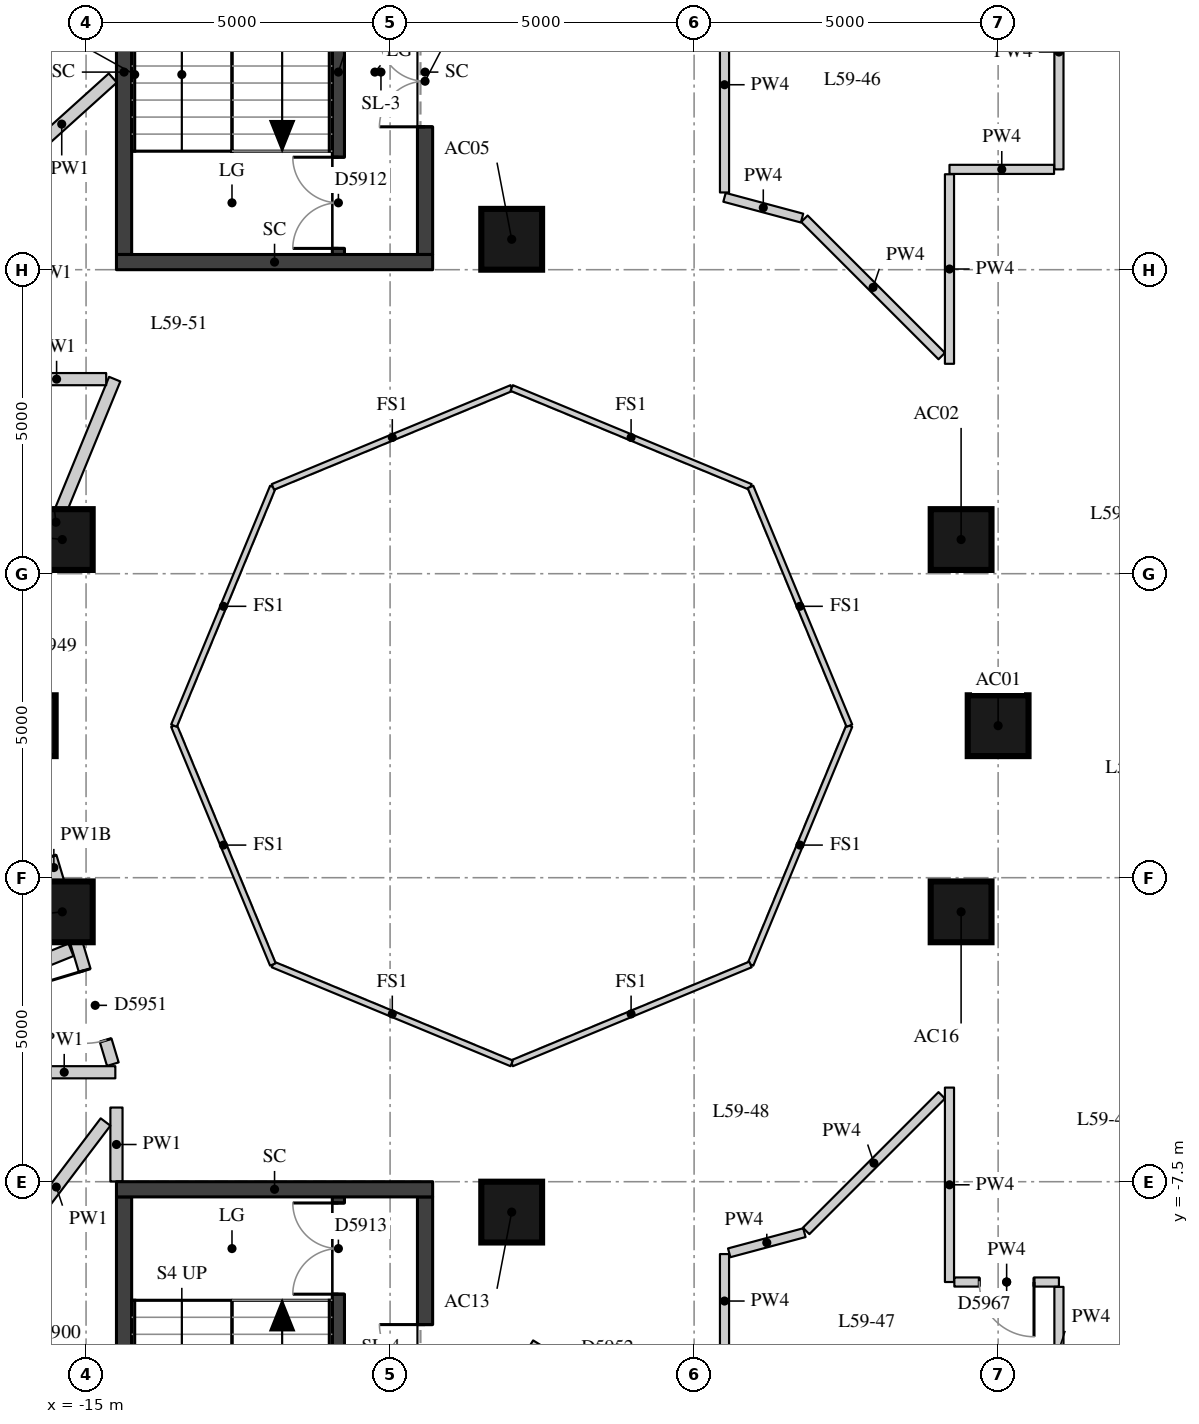
"""IFC4 building model, lengths in metres.
Left out: names, types, materials, properties, quantities, classifications, styles, units other than length and angle.
Written with IfcOpenShell. Run it as: python <this file> out.ifc"""

import sys

from ifc_helpers import new_model, si_unit, direction, frame, frame_2d, origin, origin_2d, place, context, subcontext, project, spatial, rectangle, extrude, element, fill, save


model = new_model("IFC4")
c1 = context("Model", 3, precision=1e-05, world=origin(), true_north=direction((0.0, 1.0)))
c2 = subcontext(c1, "Body", "Model", "MODEL_VIEW")
j1 = project(units=[si_unit("LENGTHUNIT", "METRE"), si_unit("PLANEANGLEUNIT", "RADIAN")], contexts=[c1])
p1 = place(None, origin())
s1 = spatial("IfcSite", under=j1, at=p1, CompositionType="ELEMENT")
p2 = place(p1, origin())
s2 = spatial("IfcBuilding", under=s1, at=p2, CompositionType="ELEMENT")
p3 = place(p2, frame((0.0, 0.0, 209.0)))
s3 = spatial("IfcBuildingStorey", under=s2, at=p3, CompositionType="ELEMENT", Elevation=209.0)
for number, where, z_axis, x_axis in (
    (1, (0.0, 0.0, 0.0), (0.0, 0.0, 1.0), (1.0, 0.0, 0.0)),
    (2, (-0.609, 3.062, 0.0), (0.0, 0.0, 1.0), (1.0, 0.0, 0.0)),
    (3, (-8.0, 8.0, 0.0), (0.0, 0.0, 1.0), (1.0, 0.0, 0.0)),
    (4, (-15.391, 3.062, 0.0), (0.0, 0.0, 1.0), (1.0, 0.0, 0.0)),
    (5, (-16.0, 0.0, 0.0), (0.0, 0.0, 1.0), (1.0, 0.0, 0.0)),
    (6, (-15.391, -3.062, 0.0), (0.0, 0.0, 1.0), (1.0, 0.0, 0.0)),
    (7, (-8.0, -8.0, 0.0), (0.0, 0.0, 1.0), (1.0, 0.0, 0.0)),
    (8, (-0.609, -3.062, 0.0), (0.0, 0.0, 1.0), (1.0, 0.0, 0.0)),
):
    element("IfcColumn", number, at=place(p3, frame(where, z_axis=z_axis, x_axis=x_axis)), inside=s3, PredefinedType="COLUMN", context=c2, shape_type="SweptSolid", body=[
        extrude(rectangle(XDim=1.0, YDim=1.0, at=origin_2d()), origin(), (0.0, 0.0, 1.0), 3.3),
    ])
p4 = place(p3, frame((-10.85, 7.75, 0.0), z_axis=(0.0, 0.0, 1.0), x_axis=(0.0, 1.0, 0.0)))
e9 = element("IfcWall", 9, at=p4, inside=s3, PredefinedType="SHEAR", context=c2, shape_type="SweptSolid", body=[
    extrude(rectangle(XDim=6.0, YDim=0.2, at=frame_2d((3.0, 0.0))), origin(), (0.0, 0.0, 1.0), 3.02),
])
p5 = place(p4, frame((0.1, 0.0, 0.0)))
e10 = element("IfcOpeningElement", 10, at=p5, cuts=e9, PredefinedType="OPENING", context=c2, shape_type="SweptSolid", body=[
    extrude(rectangle(XDim=1.5, YDim=2.1, at=frame_2d((0.75, 1.05))), frame((0.0, 0.11, 0.0), z_axis=(0.0, -1.0, 0.0), x_axis=(1.0, 0.0, 0.0)), (0.0, 0.0, 1.0), 0.22),
])
p6 = place(p3, frame((-10.85, -13.75, 0.0), z_axis=(0.0, 0.0, 1.0), x_axis=(0.0, 1.0, 0.0)))
e11 = element("IfcWall", 11, at=p6, inside=s3, PredefinedType="SHEAR", context=c2, shape_type="SweptSolid", body=[
    extrude(rectangle(XDim=6.0, YDim=0.2, at=frame_2d((3.0, 0.0))), origin(), (0.0, 0.0, 1.0), 3.02),
])
p7 = place(p6, frame((4.4, 0.0, 0.0)))
e12 = element("IfcOpeningElement", 12, at=p7, cuts=e11, PredefinedType="OPENING", context=c2, shape_type="SweptSolid", body=[
    extrude(rectangle(XDim=1.5, YDim=2.1, at=frame_2d((0.75, 1.05))), frame((0.0, 0.11, 0.0), z_axis=(0.0, -1.0, 0.0), x_axis=(1.0, 0.0, 0.0)), (0.0, 0.0, 1.0), 0.22),
])
p8 = place(p3, frame((-14.375, 7.75, -0.28), z_axis=(0.0, 0.0, 1.0), x_axis=(0.0, 1.0, 0.0)))
e13 = element("IfcWall", 13, at=p8, inside=s3, PredefinedType="SHEAR", context=c2, shape_type="SweptSolid", body=[
    extrude(rectangle(XDim=6.0, YDim=0.25, at=frame_2d((3.0, 0.0))), origin(), (0.0, 0.0, 1.0), 3.3),
])
p9 = place(p3, frame((-9.425, 7.75, -0.28), z_axis=(0.0, 0.0, 1.0), x_axis=(0.0, 1.0, 0.0)))
e14 = element("IfcWall", 14, at=p9, inside=s3, PredefinedType="SHEAR", context=c2, shape_type="SweptSolid", body=[
    extrude(rectangle(XDim=6.0, YDim=0.25, at=frame_2d((3.0, 0.0))), origin(), (0.0, 0.0, 1.0), 3.3),
])
p10 = place(p9, frame((2.1, 0.0, 0.28)))
e15 = element("IfcOpeningElement", 15, at=p10, cuts=e14, PredefinedType="OPENING", context=c2, shape_type="SweptSolid", body=[
    extrude(rectangle(XDim=1.5, YDim=2.1, at=frame_2d((0.75, 1.05))), frame((0.0, 0.135, 0.0), z_axis=(0.0, -1.0, 0.0), x_axis=(1.0, 0.0, 0.0)), (0.0, 0.0, 1.0), 0.27),
])
p11 = place(p3, frame((-14.5, 7.625, -0.28), z_axis=(0.0, 0.0, 1.0), x_axis=(1.0, 0.0, 0.0)))
e16 = element("IfcWall", 16, at=p11, inside=s3, PredefinedType="SHEAR", context=c2, shape_type="SweptSolid", body=[
    extrude(rectangle(XDim=5.2, YDim=0.25, at=frame_2d((2.6, 0.0))), origin(), (0.0, 0.0, 1.0), 3.3),
])
p12 = place(p3, frame((-14.375, -13.75, -0.28), z_axis=(0.0, 0.0, 1.0), x_axis=(0.0, 1.0, 0.0)))
e17 = element("IfcWall", 17, at=p12, inside=s3, PredefinedType="SHEAR", context=c2, shape_type="SweptSolid", body=[
    extrude(rectangle(XDim=6.0, YDim=0.25, at=frame_2d((3.0, 0.0))), origin(), (0.0, 0.0, 1.0), 3.3),
])
p13 = place(p3, frame((-9.425, -13.75, -0.28), z_axis=(0.0, 0.0, 1.0), x_axis=(0.0, 1.0, 0.0)))
e18 = element("IfcWall", 18, at=p13, inside=s3, PredefinedType="SHEAR", context=c2, shape_type="SweptSolid", body=[
    extrude(rectangle(XDim=6.0, YDim=0.25, at=frame_2d((3.0, 0.0))), origin(), (0.0, 0.0, 1.0), 3.3),
])
p14 = place(p13, frame((2.4, 0.0, 0.28)))
e19 = element("IfcOpeningElement", 19, at=p14, cuts=e18, PredefinedType="OPENING", context=c2, shape_type="SweptSolid", body=[
    extrude(rectangle(XDim=1.5, YDim=2.1, at=frame_2d((0.75, 1.05))), frame((0.0, 0.135, 0.0), z_axis=(0.0, -1.0, 0.0), x_axis=(1.0, 0.0, 0.0)), (0.0, 0.0, 1.0), 0.27),
])
p15 = place(p3, frame((-14.5, -7.625, -0.28), z_axis=(0.0, 0.0, 1.0), x_axis=(1.0, 0.0, 0.0)))
e20 = element("IfcWall", 20, at=p15, inside=s3, PredefinedType="SHEAR", context=c2, shape_type="SweptSolid", body=[
    extrude(rectangle(XDim=5.2, YDim=0.25, at=frame_2d((2.6, 0.0))), origin(), (0.0, 0.0, 1.0), 3.3),
])
p16 = place(p3, frame((-2.528, -13.4, 0.0), z_axis=(0.0, 0.0, 1.0), x_axis=(-0.850088088191, 0.526640524757, 0.0)))
e21 = element("IfcWall", 21, at=p16, inside=s3, PredefinedType="PARTITIONING", context=c2, shape_type="SweptSolid", body=[
    extrude(rectangle(XDim=6.084, YDim=0.2, at=frame_2d((3.042, 0.0))), origin(), (0.0, 0.0, 1.0), 3.02),
])
p17 = place(p16, frame((4.031, 0.0, 0.0)))
e22 = element("IfcOpeningElement", 22, at=p17, cuts=e21, PredefinedType="OPENING", context=c2, shape_type="SweptSolid", body=[
    extrude(rectangle(XDim=1.1, YDim=2.1, at=frame_2d((0.55, 1.05))), frame((0.0, 0.11, 0.0), z_axis=(0.0, -1.0, 0.0), x_axis=(1.0, 0.0, 0.0)), (0.0, 0.0, 1.0), 0.22),
])
p18 = place(p16, frame((1.206, 0.0, 0.0)))
e23 = element("IfcOpeningElement", 23, at=p18, cuts=e21, PredefinedType="OPENING", context=c2, shape_type="SweptSolid", body=[
    extrude(rectangle(XDim=0.9, YDim=2.1, at=frame_2d((0.45, 1.05))), frame((0.0, 0.11, 0.0), z_axis=(0.0, -1.0, 0.0), x_axis=(1.0, 0.0, 0.0)), (0.0, 0.0, 1.0), 0.22),
])
p19 = place(p3, frame((-14.5, -7.496, 0.0), z_axis=(0.0, 0.0, 1.0), x_axis=(0.0, 1.0, 0.0)))
e24 = element("IfcWall", 24, at=p19, inside=s3, PredefinedType="PARTITIONING", context=c2, shape_type="SweptSolid", body=[
    extrude(rectangle(XDim=1.216, YDim=0.2, at=frame_2d((0.608, 0.0))), origin(), (0.0, 0.0, 1.0), 3.02),
])
p20 = place(p3, frame((-14.679, -6.518, 0.0), z_axis=(0.0, 0.0, 1.0), x_axis=(-0.603820908912, -0.797120009761, 0.0)))
e25 = element("IfcWall", 25, at=p20, inside=s3, PredefinedType="PARTITIONING", context=c2, shape_type="SweptSolid", body=[
    extrude(rectangle(XDim=2.684, YDim=0.2, at=frame_2d((1.342, 0.0))), origin(), (0.0, 0.0, 1.0), 3.02),
])
p21 = place(p3, frame((-16.2, -5.7, 0.0), z_axis=(0.0, 0.0, 1.0), x_axis=(1.0, 0.0, 0.0)))
e26 = element("IfcWall", 26, at=p21, inside=s3, PredefinedType="PARTITIONING", context=c2, shape_type="SweptSolid", body=[
    extrude(rectangle(XDim=1.681, YDim=0.2, at=frame_2d((0.841, 0.0))), origin(), (0.0, 0.0, 1.0), 3.02),
])
p22 = place(p3, frame((-14.56, -5.567, 0.0), z_axis=(0.0, 0.0, 1.0), x_axis=(-0.287410918602, 0.95780737305, 0.0)))
e27 = element("IfcWall", 27, at=p22, inside=s3, PredefinedType="PARTITIONING", context=c2, shape_type="SweptSolid", body=[
    extrude(rectangle(XDim=6.751, YDim=0.2, at=frame_2d((3.376, 0.0))), origin(), (0.0, 0.0, 1.0), 2.52),
])
p23 = place(p22, frame((3.561, 0.0, 0.0)))
e28 = element("IfcOpeningElement", 28, at=p23, cuts=e27, PredefinedType="OPENING", context=c2, shape_type="SweptSolid", body=[
    extrude(rectangle(XDim=1.1, YDim=2.1, at=frame_2d((0.55, 1.05))), frame((0.0, 0.11, 0.0), z_axis=(0.0, -1.0, 0.0), x_axis=(1.0, 0.0, 0.0)), (0.0, 0.0, 1.0), 0.22),
])
p24 = place(p22, frame((0.41, 0.0, 0.0)))
e29 = element("IfcOpeningElement", 29, at=p24, cuts=e27, PredefinedType="OPENING", context=c2, shape_type="SweptSolid", body=[
    extrude(rectangle(XDim=1.2, YDim=2.1, at=frame_2d((0.6, 1.05))), frame((0.0, 0.11, 0.0), z_axis=(0.0, -1.0, 0.0), x_axis=(1.0, 0.0, 0.0)), (0.0, 0.0, 1.0), 0.22),
])
p25 = place(p3, frame((-16.462, 0.993, 0.0), z_axis=(0.0, 0.0, 1.0), x_axis=(0.37991958703, 0.925019517303, 0.0)))
e30 = element("IfcWall", 30, at=p25, inside=s3, PredefinedType="PARTITIONING", context=c2, shape_type="SweptSolid", body=[
    extrude(rectangle(XDim=5.089, YDim=0.2, at=frame_2d((2.544, 0.0))), origin(), (0.0, 0.0, 1.0), 2.52),
])
p26 = place(p25, frame((0.36, 0.0, 0.0)))
e31 = element("IfcOpeningElement", 31, at=p26, cuts=e30, PredefinedType="OPENING", context=c2, shape_type="SweptSolid", body=[
    extrude(rectangle(XDim=1.1, YDim=2.1, at=frame_2d((0.55, 1.05))), frame((0.0, 0.11, 0.0), z_axis=(0.0, -1.0, 0.0), x_axis=(1.0, 0.0, 0.0)), (0.0, 0.0, 1.0), 0.22),
])
p27 = place(p3, frame((-14.669, 5.7, 0.0), z_axis=(0.0, 0.0, 1.0), x_axis=(-1.0, 0.0, 0.0)))
e32 = element("IfcWall", 32, at=p27, inside=s3, PredefinedType="PARTITIONING", context=c2, shape_type="SweptSolid", body=[
    extrude(rectangle(XDim=1.631, YDim=0.2, at=frame_2d((0.815, 0.0))), origin(), (0.0, 0.0, 1.0), 3.02),
])
p28 = place(p3, frame((-16.24, 9.136, 0.0), z_axis=(0.0, 0.0, 1.0), x_axis=(0.74251608424, 0.66982823518, 0.0)))
e33 = element("IfcWall", 33, at=p28, inside=s3, PredefinedType="PARTITIONING", context=c2, shape_type="SweptSolid", body=[
    extrude(rectangle(XDim=2.264, YDim=0.2, at=frame_2d((1.132, 0.0))), origin(), (0.0, 0.0, 1.0), 3.02),
])
p29 = place(p3, frame((1.0, 13.011, 0.0), z_axis=(0.0, 0.0, 1.0), x_axis=(0.0, -1.0, 0.0)))
e34 = element("IfcWall", 34, at=p29, inside=s3, PredefinedType="PARTITIONING", context=c2, shape_type="SweptSolid", body=[
    extrude(rectangle(XDim=3.861, YDim=0.15, at=frame_2d((1.93, 0.0))), origin(), (0.0, 0.0, 1.0), 3.02),
])
p30 = place(p3, frame((0.92, 9.15, 0.0), z_axis=(0.0, 0.0, 1.0), x_axis=(-1.0, 0.0, 0.0)))
e35 = element("IfcWall", 35, at=p30, inside=s3, PredefinedType="PARTITIONING", context=c2, shape_type="SweptSolid", body=[
    extrude(rectangle(XDim=1.72, YDim=0.15, at=frame_2d((0.86, 0.0))), origin(), (0.0, 0.0, 1.0), 3.02),
])
p31 = place(p3, frame((-0.8, 9.07, 0.0), z_axis=(0.0, 0.0, 1.0), x_axis=(0.0, -1.0, 0.0)))
e36 = element("IfcWall", 36, at=p31, inside=s3, PredefinedType="PARTITIONING", context=c2, shape_type="SweptSolid", body=[
    extrude(rectangle(XDim=3.118, YDim=0.15, at=frame_2d((1.559, 0.0))), origin(), (0.0, 0.0, 1.0), 3.02),
])
p32 = place(p3, frame((-0.927, 6.08, 0.0), z_axis=(0.0, 0.0, 1.0), x_axis=(-0.707106781187, 0.707106781187, 0.0)))
e37 = element("IfcWall", 37, at=p32, inside=s3, PredefinedType="PARTITIONING", context=c2, shape_type="SweptSolid", body=[
    extrude(rectangle(XDim=3.194, YDim=0.15, at=frame_2d((1.597, 0.0))), origin(), (0.0, 0.0, 1.0), 3.02),
])
p33 = place(p3, frame((-3.225, 8.348, 0.0), z_axis=(0.0, 0.0, 1.0), x_axis=(-0.965915035697, 0.258859312783, 0.0)))
e38 = element("IfcWall", 38, at=p33, inside=s3, PredefinedType="PARTITIONING", context=c2, shape_type="SweptSolid", body=[
    extrude(rectangle(XDim=1.32, YDim=0.15, at=frame_2d((0.66, 0.0))), origin(), (0.0, 0.0, 1.0), 3.02),
])
p34 = place(p3, frame((-4.5, 8.77, 0.0), z_axis=(0.0, 0.0, 1.0), x_axis=(0.0, 1.0, 0.0)))
e39 = element("IfcWall", 39, at=p34, inside=s3, PredefinedType="PARTITIONING", context=c2, shape_type="SweptSolid", body=[
    extrude(rectangle(XDim=3.543, YDim=0.15, at=frame_2d((1.772, 0.0))), origin(), (0.0, 0.0, 1.0), 3.02),
])
p35 = place(p3, frame((-0.8, -5.952, 0.0), z_axis=(0.0, 0.0, 1.0), x_axis=(0.0, -1.0, 0.0)))
e40 = element("IfcWall", 40, at=p35, inside=s3, PredefinedType="PARTITIONING", context=c2, shape_type="SweptSolid", body=[
    extrude(rectangle(XDim=3.198, YDim=0.15, at=frame_2d((1.599, 0.0))), origin(), (0.0, 0.0, 1.0), 3.02),
])
p36 = place(p3, frame((-0.72, -9.15, 0.0), z_axis=(0.0, 0.0, 1.0), x_axis=(1.0, 0.0, 0.0)))
e41 = element("IfcWall", 41, at=p36, inside=s3, PredefinedType="PARTITIONING", context=c2, shape_type="SweptSolid", body=[
    extrude(rectangle(XDim=1.72, YDim=0.15, at=frame_2d((0.86, 0.0))), origin(), (0.0, 0.0, 1.0), 3.02),
])
p37 = place(p36, frame((0.41, 0.0, 0.0)))
e42 = element("IfcOpeningElement", 42, at=p37, cuts=e41, PredefinedType="OPENING", context=c2, shape_type="SweptSolid", body=[
    extrude(rectangle(XDim=0.9, YDim=2.1, at=frame_2d((0.45, 1.05))), frame((0.0, 0.085, 0.0), z_axis=(0.0, -1.0, 0.0), x_axis=(1.0, 0.0, 0.0)), (0.0, 0.0, 1.0), 0.17),
])
p38 = place(p3, frame((1.0, -9.23, 0.0), z_axis=(0.0, 0.0, 1.0), x_axis=(0.0, -1.0, 0.0)))
e43 = element("IfcWall", 43, at=p38, inside=s3, PredefinedType="PARTITIONING", context=c2, shape_type="SweptSolid", body=[
    extrude(rectangle(XDim=2.061, YDim=0.15, at=frame_2d((1.03, 0.0))), origin(), (0.0, 0.0, 1.0), 3.02),
])
p39 = place(p3, frame((-4.5, -10.235, 0.0), z_axis=(0.0, 0.0, 1.0), x_axis=(0.0, 1.0, 0.0)))
e44 = element("IfcWall", 44, at=p39, inside=s3, PredefinedType="PARTITIONING", context=c2, shape_type="SweptSolid", body=[
    extrude(rectangle(XDim=1.545, YDim=0.15, at=frame_2d((0.772, 0.0))), origin(), (0.0, 0.0, 1.0), 3.02),
])
p40 = place(p3, frame((-4.423, -8.67, 0.0), z_axis=(0.0, 0.0, 1.0), x_axis=(0.965898680525, 0.258920333232, 0.0)))
e45 = element("IfcWall", 45, at=p40, inside=s3, PredefinedType="PARTITIONING", context=c2, shape_type="SweptSolid", body=[
    extrude(rectangle(XDim=1.281, YDim=0.15, at=frame_2d((0.64, 0.0))), origin(), (0.0, 0.0, 1.0), 3.02),
])
p41 = place(p3, frame((-3.158, -8.31, 0.0), z_axis=(0.0, 0.0, 1.0), x_axis=(0.707106781187, 0.707106781187, 0.0)))
e46 = element("IfcWall", 46, at=p41, inside=s3, PredefinedType="PARTITIONING", context=c2, shape_type="SweptSolid", body=[
    extrude(rectangle(XDim=3.154, YDim=0.15, at=frame_2d((1.577, 0.0))), origin(), (0.0, 0.0, 1.0), 3.02),
])
p42 = place(p3, frame((-22.896, -6.771, 0.0), z_axis=(0.0, 0.0, 1.0), x_axis=(0.92738233242, 0.374114968313, 0.0)))
e47 = element("IfcWall", 47, at=p42, inside=s3, PredefinedType="PARTITIONING", context=c2, shape_type="SweptSolid", body=[
    extrude(rectangle(XDim=8.246, YDim=0.22, at=frame_2d((4.123, 0.0))), origin(), (0.0, 0.0, 1.0), 3.02),
])
for number, where, z_axis, x_axis in (
    (48, (-2.446, 0.0, 0.0), (0.0, 0.0, 1.0), (-0.383, -0.924, 0.0)),
    (49, (-4.073, -3.927, 0.0), (0.0, 0.0, 1.0), (-0.924, -0.383, 0.0)),
    (50, (-8.0, -5.554, 0.0), (0.0, 0.0, 1.0), (-0.924, 0.383, 0.0)),
    (51, (-11.927, -3.927, 0.0), (0.0, 0.0, 1.0), (-0.383, 0.924, 0.0)),
    (52, (-13.554, 0.0, 0.0), (0.0, 0.0, 1.0), (0.383, 0.924, 0.0)),
    (53, (-11.927, 3.927, 0.0), (0.0, 0.0, 1.0), (0.924, 0.383, 0.0)),
    (54, (-8.0, 5.554, 0.0), (0.0, 0.0, 1.0), (0.924, -0.383, 0.0)),
    (55, (-4.073, 3.927, 0.0), (0.0, 0.0, 1.0), (0.383, -0.924, 0.0)),
):
    element("IfcWall", number, at=place(p3, frame(where, z_axis=z_axis, x_axis=x_axis)), inside=s3, PredefinedType="PARTITIONING", context=c2, shape_type="SweptSolid", body=[
        extrude(rectangle(XDim=4.251, YDim=0.1, at=frame_2d((2.125, 0.0))), origin(), (0.0, 0.0, 1.0), 3.02),
    ])
p43 = place(p5, origin())
e56 = element("IfcDoor", 56, at=p43, inside=s3, OperationType="DOUBLE_DOOR_SINGLE_SWING", PredefinedType="DOOR", context=c2, shape_type="SweptSolid", body=[
    extrude(rectangle(XDim=1.5, YDim=2.1, at=frame_2d((0.75, 1.05))), frame((0.0, 0.025, 0.0), z_axis=(0.0, -1.0, 0.0), x_axis=(1.0, 0.0, 0.0)), (0.0, 0.0, 1.0), 0.05),
])
fill(e10, e56)
p44 = place(p7, origin())
e57 = element("IfcDoor", 57, at=p44, inside=s3, OperationType="DOUBLE_DOOR_SINGLE_SWING", PredefinedType="DOOR", context=c2, shape_type="SweptSolid", body=[
    extrude(rectangle(XDim=1.5, YDim=2.1, at=frame_2d((0.75, 1.05))), frame((0.0, 0.025, 0.0), z_axis=(0.0, -1.0, 0.0), x_axis=(1.0, 0.0, 0.0)), (0.0, 0.0, 1.0), 0.05),
])
fill(e12, e57)
p45 = place(p10, origin())
e58 = element("IfcDoor", 58, at=p45, inside=s3, OperationType="DOUBLE_DOOR_SINGLE_SWING", PredefinedType="DOOR", context=c2, shape_type="SweptSolid", body=[
    extrude(rectangle(XDim=1.5, YDim=2.1, at=frame_2d((0.75, 1.05))), frame((0.0, 0.025, 0.0), z_axis=(0.0, -1.0, 0.0), x_axis=(1.0, 0.0, 0.0)), (0.0, 0.0, 1.0), 0.05),
])
fill(e15, e58)
p46 = place(p14, origin())
e59 = element("IfcDoor", 59, at=p46, inside=s3, OperationType="DOUBLE_DOOR_SINGLE_SWING", PredefinedType="DOOR", context=c2, shape_type="SweptSolid", body=[
    extrude(rectangle(XDim=1.5, YDim=2.1, at=frame_2d((0.75, 1.05))), frame((0.0, 0.025, 0.0), z_axis=(0.0, -1.0, 0.0), x_axis=(1.0, 0.0, 0.0)), (0.0, 0.0, 1.0), 0.05),
])
fill(e19, e59)
p47 = place(p24, origin())
e60 = element("IfcDoor", 60, at=p47, inside=s3, OperationType="SINGLE_SWING_RIGHT", PredefinedType="DOOR", context=c2, shape_type="SweptSolid", body=[
    extrude(rectangle(XDim=1.2, YDim=2.1, at=frame_2d((0.6, 1.05))), frame((0.0, 0.025, 0.0), z_axis=(0.0, -1.0, 0.0), x_axis=(1.0, 0.0, 0.0)), (0.0, 0.0, 1.0), 0.05),
])
fill(e29, e60)
p48 = place(p37, origin())
e61 = element("IfcDoor", 61, at=p48, inside=s3, OperationType="SINGLE_SWING_LEFT", PredefinedType="DOOR", context=c2, shape_type="SweptSolid", body=[
    extrude(rectangle(XDim=0.9, YDim=2.1, at=frame_2d((0.45, 1.05))), frame((0.0, 0.025, 0.0), z_axis=(0.0, -1.0, 0.0), x_axis=(1.0, 0.0, 0.0)), (0.0, 0.0, 1.0), 0.05),
])
fill(e42, e61)
save(model, sys.argv[1])
